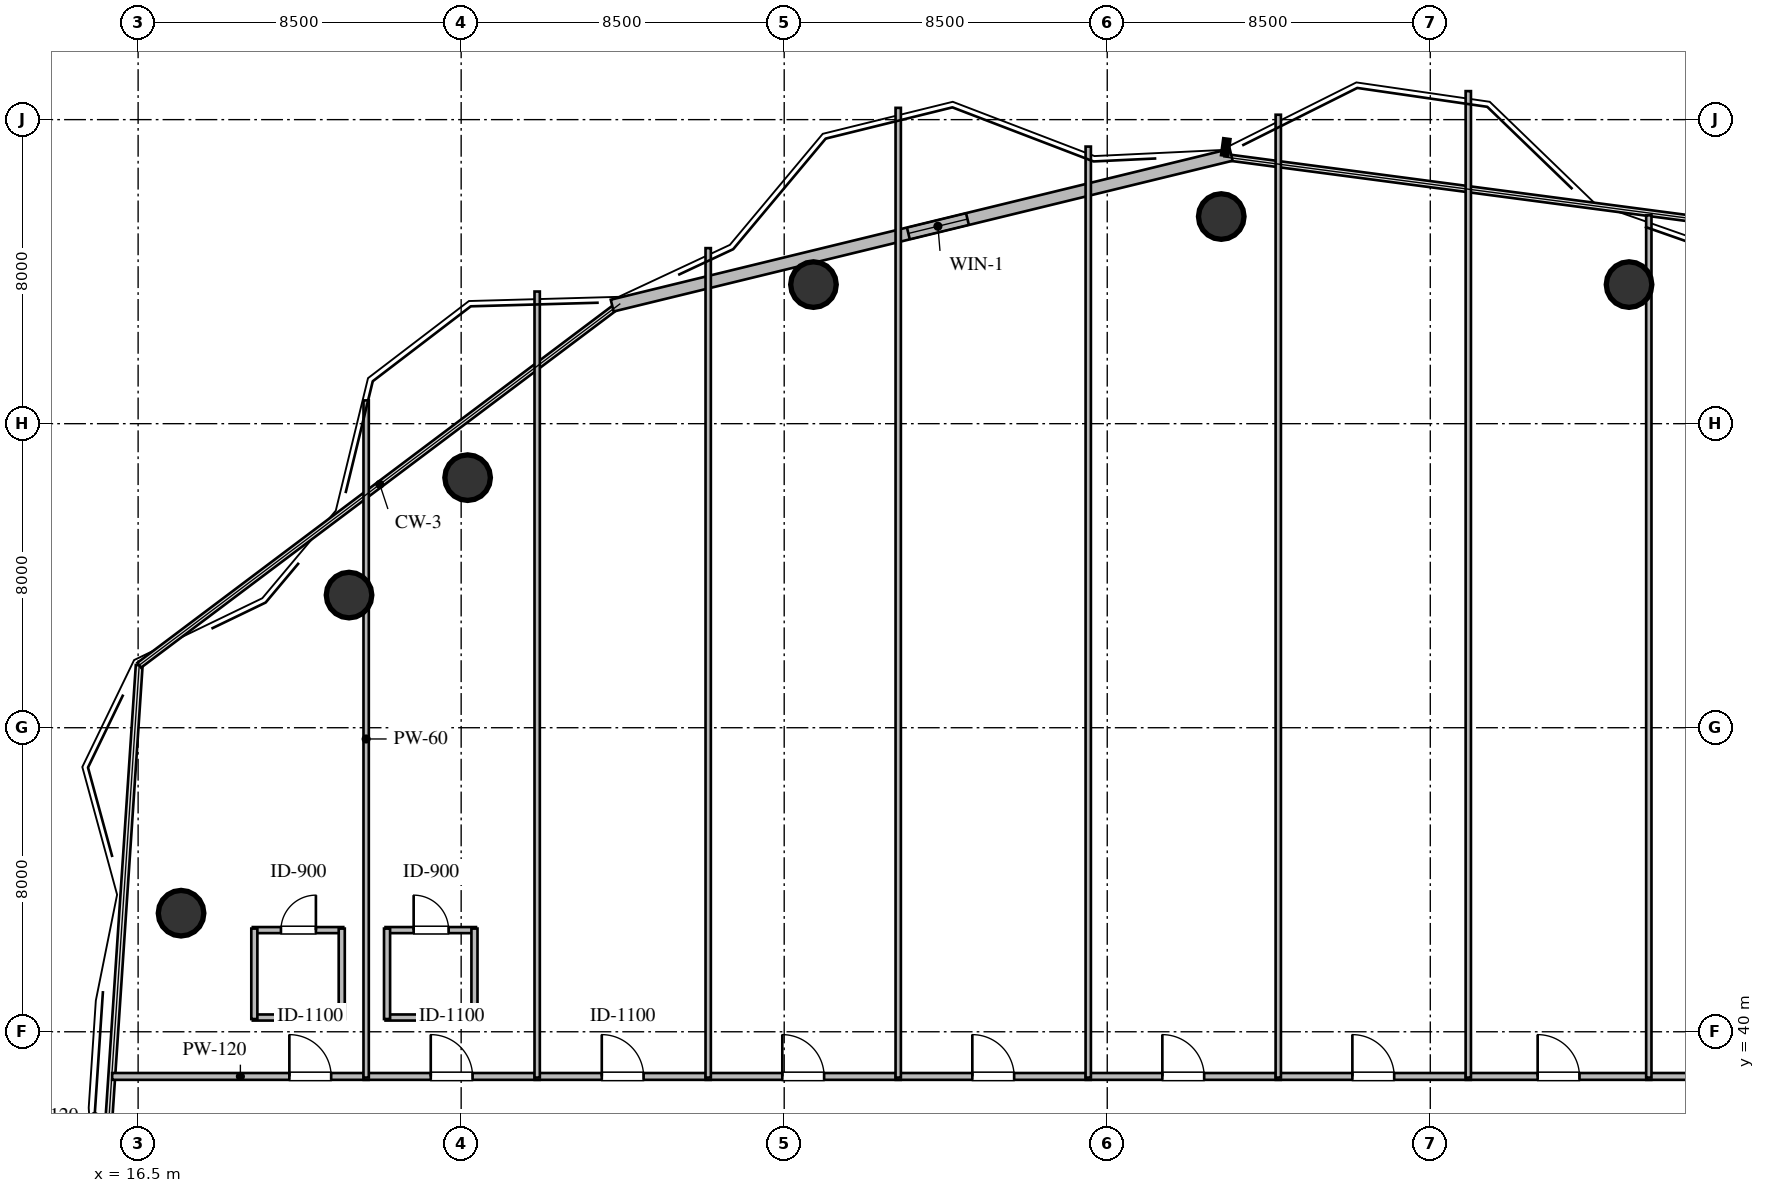
"""IFC4 building model, lengths in metres.
Left out: names, types, materials, properties, quantities, classifications, styles, units other than length and angle.
Written with IfcOpenShell. Run it as: python <this file> out.ifc"""

import sys

from ifc_helpers import new_model, si_unit, direction, frame, frame_2d, origin, origin_2d, place, context, subcontext, project, spatial, rectangle, circle, extrude, element, fill, save


model = new_model("IFC4")
c1 = context("Model", 3, precision=1e-05, world=origin(), true_north=direction((0.0, 1.0)))
c2 = subcontext(c1, "Body", "Model", "MODEL_VIEW")
j1 = project(units=[si_unit("LENGTHUNIT", "METRE"), si_unit("PLANEANGLEUNIT", "RADIAN")], contexts=[c1])
p1 = place(None, origin())
s1 = spatial("IfcSite", under=j1, at=p1, CompositionType="ELEMENT")
p2 = place(p1, origin())
s2 = spatial("IfcBuilding", under=s1, at=p2, CompositionType="ELEMENT")
p3 = place(p2, frame((0.0, 0.0, 127.8)))
s3 = spatial("IfcBuildingStorey", under=s2, at=p3, CompositionType="ELEMENT", Elevation=127.8)
for number, where, z_axis, x_axis in (
    (1, (55.73, 59.66, 0.0), (0.0, 0.0, 1.0), (1.0, 0.0, 0.0)),
    (2, (45.0, 61.45, 0.0), (0.0, 0.0, 1.0), (1.0, 0.0, 0.0)),
    (3, (34.27, 59.66, 0.0), (0.0, 0.0, 1.0), (1.0, 0.0, 0.0)),
    (4, (25.17, 54.58, 0.0), (0.0, 0.0, 1.0), (1.0, 0.0, 0.0)),
    (5, (22.05, 51.49, 0.0), (0.0, 0.0, 1.0), (1.0, 0.0, 0.0)),
    (6, (17.63, 43.12, 0.0), (0.0, 0.0, 1.0), (1.0, 0.0, 0.0)),
):
    element("IfcColumn", number, at=place(p3, frame(where, z_axis=z_axis, x_axis=x_axis)), inside=s3, PredefinedType="COLUMN", context=c2, shape_type="SweptSolid", body=[
        extrude(circle(Radius=0.6, at=origin_2d()), origin(), (0.0, 0.0, 1.0), 3.6),
    ])
p4 = place(p3, frame((28.974, 59.107, 0.0), z_axis=(0.0, 0.0, 1.0), x_axis=(0.971593971582, 0.236654081699, 0.0)))
e7 = element("IfcWall", 7, at=p4, inside=s3, PredefinedType="STANDARD", context=c2, shape_type="SweptSolid", body=[
    extrude(rectangle(XDim=16.763, YDim=0.32, at=frame_2d((8.381, 0.0))), origin(), (0.0, 0.0, 1.0), 3.36),
])
p5 = place(p4, frame((8.021, 0.0, 1.05)))
e8 = element("IfcOpeningElement", 8, at=p5, cuts=e7, PredefinedType="OPENING", context=c2, shape_type="SweptSolid", body=[
    extrude(rectangle(XDim=1.6, YDim=1.5, at=frame_2d((0.8, 0.75))), frame((0.0, 0.17, 0.0), z_axis=(0.0, -1.0, 0.0), x_axis=(1.0, 0.0, 0.0)), (0.0, 0.0, 1.0), 0.34),
])
p6 = place(p3, frame((19.518, 40.375, 0.0), z_axis=(0.0, 0.0, 1.0), x_axis=(1.0, 0.0, 0.0)))
e9 = element("IfcWall", 9, at=p6, inside=s3, PredefinedType="PLUMBINGWALL", context=c2, shape_type="SweptSolid", body=[
    extrude(rectangle(XDim=2.38, YDim=0.16, at=frame_2d((1.19, 0.0))), origin(), (0.0, 0.0, 1.0), 3.36),
])
p7 = place(p3, frame((19.518, 42.675, 0.0), z_axis=(0.0, 0.0, 1.0), x_axis=(1.0, 0.0, 0.0)))
e10 = element("IfcWall", 10, at=p7, inside=s3, PredefinedType="PLUMBINGWALL", context=c2, shape_type="SweptSolid", body=[
    extrude(rectangle(XDim=2.38, YDim=0.16, at=frame_2d((1.19, 0.0))), origin(), (0.0, 0.0, 1.0), 3.36),
])
p8 = place(p7, frame((0.74, 0.0, 0.0)))
e11 = element("IfcOpeningElement", 11, at=p8, cuts=e10, PredefinedType="OPENING", context=c2, shape_type="SweptSolid", body=[
    extrude(rectangle(XDim=0.92, YDim=2.1, at=frame_2d((0.46, 1.05))), frame((0.0, 0.09, 0.0), z_axis=(0.0, -1.0, 0.0), x_axis=(1.0, 0.0, 0.0)), (0.0, 0.0, 1.0), 0.18),
])
p9 = place(p3, frame((19.558, 40.335, 0.0), z_axis=(0.0, 0.0, 1.0), x_axis=(0.0, 1.0, 0.0)))
e12 = element("IfcWall", 12, at=p9, inside=s3, PredefinedType="PLUMBINGWALL", context=c2, shape_type="SweptSolid", body=[
    extrude(rectangle(XDim=2.38, YDim=0.16, at=frame_2d((1.19, 0.0))), origin(), (0.0, 0.0, 1.0), 3.36),
])
p10 = place(p3, frame((21.858, 40.335, 0.0), z_axis=(0.0, 0.0, 1.0), x_axis=(0.0, 1.0, 0.0)))
e13 = element("IfcWall", 13, at=p10, inside=s3, PredefinedType="PLUMBINGWALL", context=c2, shape_type="SweptSolid", body=[
    extrude(rectangle(XDim=2.38, YDim=0.16, at=frame_2d((1.19, 0.0))), origin(), (0.0, 0.0, 1.0), 2.89),
])
p11 = place(p3, frame((23.01, 40.375, 0.0), z_axis=(0.0, 0.0, 1.0), x_axis=(1.0, 0.0, 0.0)))
e14 = element("IfcWall", 14, at=p11, inside=s3, PredefinedType="PLUMBINGWALL", context=c2, shape_type="SweptSolid", body=[
    extrude(rectangle(XDim=2.38, YDim=0.16, at=frame_2d((1.19, 0.0))), origin(), (0.0, 0.0, 1.0), 3.36),
])
p12 = place(p3, frame((23.01, 42.675, 0.0), z_axis=(0.0, 0.0, 1.0), x_axis=(1.0, 0.0, 0.0)))
e15 = element("IfcWall", 15, at=p12, inside=s3, PredefinedType="PLUMBINGWALL", context=c2, shape_type="SweptSolid", body=[
    extrude(rectangle(XDim=2.38, YDim=0.16, at=frame_2d((1.19, 0.0))), origin(), (0.0, 0.0, 1.0), 3.36),
])
p13 = place(p12, frame((0.74, 0.0, 0.0)))
e16 = element("IfcOpeningElement", 16, at=p13, cuts=e15, PredefinedType="OPENING", context=c2, shape_type="SweptSolid", body=[
    extrude(rectangle(XDim=0.92, YDim=2.1, at=frame_2d((0.46, 1.05))), frame((0.0, 0.09, 0.0), z_axis=(0.0, -1.0, 0.0), x_axis=(1.0, 0.0, 0.0)), (0.0, 0.0, 1.0), 0.18),
])
p14 = place(p3, frame((23.05, 40.335, 0.0), z_axis=(0.0, 0.0, 1.0), x_axis=(0.0, 1.0, 0.0)))
e17 = element("IfcWall", 17, at=p14, inside=s3, PredefinedType="PLUMBINGWALL", context=c2, shape_type="SweptSolid", body=[
    extrude(rectangle(XDim=2.38, YDim=0.16, at=frame_2d((1.19, 0.0))), origin(), (0.0, 0.0, 1.0), 2.89),
])
p15 = place(p3, frame((25.35, 40.335, 0.0), z_axis=(0.0, 0.0, 1.0), x_axis=(0.0, 1.0, 0.0)))
e18 = element("IfcWall", 18, at=p15, inside=s3, PredefinedType="PLUMBINGWALL", context=c2, shape_type="SweptSolid", body=[
    extrude(rectangle(XDim=2.38, YDim=0.16, at=frame_2d((1.19, 0.0))), origin(), (0.0, 0.0, 1.0), 3.36),
])
p16 = place(p3, frame((15.817, 38.825, 0.0), z_axis=(0.0, 0.0, 1.0), x_axis=(1.0, 0.0, 0.0)))
e19 = element("IfcWall", 19, at=p16, inside=s3, PredefinedType="PARTITIONING", context=c2, shape_type="SweptSolid", body=[
    extrude(rectangle(XDim=6.748, YDim=0.18, at=frame_2d((3.374, 0.0))), origin(), (0.0, 0.0, 1.0), 3.36),
])
p17 = place(p16, frame((4.663, 0.0, 0.0)))
e20 = element("IfcOpeningElement", 20, at=p17, cuts=e19, PredefinedType="OPENING", context=c2, shape_type="SweptSolid", body=[
    extrude(rectangle(XDim=1.1, YDim=2.1, at=frame_2d((0.55, 1.05))), frame((0.0, 0.1, 0.0), z_axis=(0.0, -1.0, 0.0), x_axis=(1.0, 0.0, 0.0)), (0.0, 0.0, 1.0), 0.2),
])
p18 = place(p3, frame((22.435, 38.825, 0.0), z_axis=(0.0, 0.0, 1.0), x_axis=(1.0, 0.0, 0.0)))
e21 = element("IfcWall", 21, at=p18, inside=s3, PredefinedType="PARTITIONING", context=c2, shape_type="SweptSolid", body=[
    extrude(rectangle(XDim=4.63, YDim=0.18, at=frame_2d((2.315, 0.0))), origin(), (0.0, 0.0, 1.0), 3.36),
])
p19 = place(p18, frame((1.765, 0.0, 0.0)))
e22 = element("IfcOpeningElement", 22, at=p19, cuts=e21, PredefinedType="OPENING", context=c2, shape_type="SweptSolid", body=[
    extrude(rectangle(XDim=1.1, YDim=2.1, at=frame_2d((0.55, 1.05))), frame((0.0, 0.1, 0.0), z_axis=(0.0, -1.0, 0.0), x_axis=(1.0, 0.0, 0.0)), (0.0, 0.0, 1.0), 0.2),
])
p20 = place(p3, frame((26.935, 38.825, 0.0), z_axis=(0.0, 0.0, 1.0), x_axis=(1.0, 0.0, 0.0)))
e23 = element("IfcWall", 23, at=p20, inside=s3, PredefinedType="PARTITIONING", context=c2, shape_type="SweptSolid", body=[
    extrude(rectangle(XDim=4.63, YDim=0.18, at=frame_2d((2.315, 0.0))), origin(), (0.0, 0.0, 1.0), 3.36),
])
p21 = place(p20, frame((1.765, 0.0, 0.0)))
e24 = element("IfcOpeningElement", 24, at=p21, cuts=e23, PredefinedType="OPENING", context=c2, shape_type="SweptSolid", body=[
    extrude(rectangle(XDim=1.1, YDim=2.1, at=frame_2d((0.55, 1.05))), frame((0.0, 0.1, 0.0), z_axis=(0.0, -1.0, 0.0), x_axis=(1.0, 0.0, 0.0)), (0.0, 0.0, 1.0), 0.2),
])
p22 = place(p3, frame((31.435, 38.825, 0.0), z_axis=(0.0, 0.0, 1.0), x_axis=(1.0, 0.0, 0.0)))
e25 = element("IfcWall", 25, at=p22, inside=s3, PredefinedType="PARTITIONING", context=c2, shape_type="SweptSolid", body=[
    extrude(rectangle(XDim=5.13, YDim=0.18, at=frame_2d((2.565, 0.0))), origin(), (0.0, 0.0, 1.0), 3.36),
])
p23 = place(p22, frame((2.015, 0.0, 0.0)))
e26 = element("IfcOpeningElement", 26, at=p23, cuts=e25, PredefinedType="OPENING", context=c2, shape_type="SweptSolid", body=[
    extrude(rectangle(XDim=1.1, YDim=2.1, at=frame_2d((0.55, 1.05))), frame((0.0, 0.1, 0.0), z_axis=(0.0, -1.0, 0.0), x_axis=(1.0, 0.0, 0.0)), (0.0, 0.0, 1.0), 0.2),
])
p24 = place(p3, frame((36.435, 38.825, 0.0), z_axis=(0.0, 0.0, 1.0), x_axis=(1.0, 0.0, 0.0)))
e27 = element("IfcWall", 27, at=p24, inside=s3, PredefinedType="PARTITIONING", context=c2, shape_type="SweptSolid", body=[
    extrude(rectangle(XDim=5.13, YDim=0.18, at=frame_2d((2.565, 0.0))), origin(), (0.0, 0.0, 1.0), 3.36),
])
p25 = place(p24, frame((2.015, 0.0, 0.0)))
e28 = element("IfcOpeningElement", 28, at=p25, cuts=e27, PredefinedType="OPENING", context=c2, shape_type="SweptSolid", body=[
    extrude(rectangle(XDim=1.1, YDim=2.1, at=frame_2d((0.55, 1.05))), frame((0.0, 0.1, 0.0), z_axis=(0.0, -1.0, 0.0), x_axis=(1.0, 0.0, 0.0)), (0.0, 0.0, 1.0), 0.2),
])
p26 = place(p3, frame((41.435, 38.825, 0.0), z_axis=(0.0, 0.0, 1.0), x_axis=(1.0, 0.0, 0.0)))
e29 = element("IfcWall", 29, at=p26, inside=s3, PredefinedType="PARTITIONING", context=c2, shape_type="SweptSolid", body=[
    extrude(rectangle(XDim=5.13, YDim=0.18, at=frame_2d((2.565, 0.0))), origin(), (0.0, 0.0, 1.0), 3.36),
])
p27 = place(p26, frame((2.015, 0.0, 0.0)))
e30 = element("IfcOpeningElement", 30, at=p27, cuts=e29, PredefinedType="OPENING", context=c2, shape_type="SweptSolid", body=[
    extrude(rectangle(XDim=1.1, YDim=2.1, at=frame_2d((0.55, 1.05))), frame((0.0, 0.1, 0.0), z_axis=(0.0, -1.0, 0.0), x_axis=(1.0, 0.0, 0.0)), (0.0, 0.0, 1.0), 0.2),
])
p28 = place(p3, frame((46.435, 38.825, 0.0), z_axis=(0.0, 0.0, 1.0), x_axis=(1.0, 0.0, 0.0)))
e31 = element("IfcWall", 31, at=p28, inside=s3, PredefinedType="PARTITIONING", context=c2, shape_type="SweptSolid", body=[
    extrude(rectangle(XDim=5.13, YDim=0.18, at=frame_2d((2.565, 0.0))), origin(), (0.0, 0.0, 1.0), 3.36),
])
p29 = place(p28, frame((2.015, 0.0, 0.0)))
e32 = element("IfcOpeningElement", 32, at=p29, cuts=e31, PredefinedType="OPENING", context=c2, shape_type="SweptSolid", body=[
    extrude(rectangle(XDim=1.1, YDim=2.1, at=frame_2d((0.55, 1.05))), frame((0.0, 0.1, 0.0), z_axis=(0.0, -1.0, 0.0), x_axis=(1.0, 0.0, 0.0)), (0.0, 0.0, 1.0), 0.2),
])
p30 = place(p3, frame((51.435, 38.825, 0.0), z_axis=(0.0, 0.0, 1.0), x_axis=(1.0, 0.0, 0.0)))
e33 = element("IfcWall", 33, at=p30, inside=s3, PredefinedType="PARTITIONING", context=c2, shape_type="SweptSolid", body=[
    extrude(rectangle(XDim=4.88, YDim=0.18, at=frame_2d((2.44, 0.0))), origin(), (0.0, 0.0, 1.0), 3.36),
])
p31 = place(p30, frame((1.89, 0.0, 0.0)))
e34 = element("IfcOpeningElement", 34, at=p31, cuts=e33, PredefinedType="OPENING", context=c2, shape_type="SweptSolid", body=[
    extrude(rectangle(XDim=1.1, YDim=2.1, at=frame_2d((0.55, 1.05))), frame((0.0, 0.1, 0.0), z_axis=(0.0, -1.0, 0.0), x_axis=(1.0, 0.0, 0.0)), (0.0, 0.0, 1.0), 0.2),
])
p32 = place(p3, frame((56.185, 38.825, 0.0), z_axis=(0.0, 0.0, 1.0), x_axis=(1.0, 0.0, 0.0)))
e35 = element("IfcWall", 35, at=p32, inside=s3, PredefinedType="PARTITIONING", context=c2, shape_type="SweptSolid", body=[
    extrude(rectangle(XDim=4.88, YDim=0.18, at=frame_2d((2.44, 0.0))), origin(), (0.0, 0.0, 1.0), 3.36),
])
p33 = place(p32, frame((1.89, 0.0, 0.0)))
e36 = element("IfcOpeningElement", 36, at=p33, cuts=e35, PredefinedType="OPENING", context=c2, shape_type="SweptSolid", body=[
    extrude(rectangle(XDim=1.1, YDim=2.1, at=frame_2d((0.55, 1.05))), frame((0.0, 0.1, 0.0), z_axis=(0.0, -1.0, 0.0), x_axis=(1.0, 0.0, 0.0)), (0.0, 0.0, 1.0), 0.2),
])
p34 = place(p3, frame((22.5, 56.613, 0.0), z_axis=(0.0, 0.0, 1.0), x_axis=(0.0, -1.0, 0.0)))
e37 = element("IfcWall", 37, at=p34, inside=s3, PredefinedType="PARTITIONING", context=c2, shape_type="SweptSolid", body=[
    extrude(rectangle(XDim=17.818, YDim=0.14, at=frame_2d((8.909, 0.0))), origin(), (0.0, 0.0, 1.0), 2.89),
])
p35 = place(p3, frame((27.0, 59.477, 0.0), z_axis=(0.0, 0.0, 1.0), x_axis=(0.0, -1.0, 0.0)))
e38 = element("IfcWall", 38, at=p35, inside=s3, PredefinedType="PARTITIONING", context=c2, shape_type="SweptSolid", body=[
    extrude(rectangle(XDim=20.682, YDim=0.14, at=frame_2d((10.341, 0.0))), origin(), (0.0, 0.0, 1.0), 3.36),
])
p36 = place(p3, frame((31.5, 60.619, 0.0), z_axis=(0.0, 0.0, 1.0), x_axis=(0.0, -1.0, 0.0)))
e39 = element("IfcWall", 39, at=p36, inside=s3, PredefinedType="PARTITIONING", context=c2, shape_type="SweptSolid", body=[
    extrude(rectangle(XDim=21.824, YDim=0.14, at=frame_2d((10.912, 0.0))), origin(), (0.0, 0.0, 1.0), 3.36),
])
p37 = place(p3, frame((36.5, 64.31, 0.0), z_axis=(0.0, 0.0, 1.0), x_axis=(0.0, -1.0, 0.0)))
e40 = element("IfcWall", 40, at=p37, inside=s3, PredefinedType="PARTITIONING", context=c2, shape_type="SweptSolid", body=[
    extrude(rectangle(XDim=25.515, YDim=0.14, at=frame_2d((12.758, 0.0))), origin(), (0.0, 0.0, 1.0), 3.36),
])
p38 = place(p3, frame((41.5, 63.291, 0.0), z_axis=(0.0, 0.0, 1.0), x_axis=(0.0, -1.0, 0.0)))
e41 = element("IfcWall", 41, at=p38, inside=s3, PredefinedType="PARTITIONING", context=c2, shape_type="SweptSolid", body=[
    extrude(rectangle(XDim=24.496, YDim=0.14, at=frame_2d((12.248, 0.0))), origin(), (0.0, 0.0, 1.0), 3.36),
])
p39 = place(p3, frame((46.5, 64.129, 0.0), z_axis=(0.0, 0.0, 1.0), x_axis=(0.0, -1.0, 0.0)))
e42 = element("IfcWall", 42, at=p39, inside=s3, PredefinedType="PARTITIONING", context=c2, shape_type="SweptSolid", body=[
    extrude(rectangle(XDim=25.334, YDim=0.14, at=frame_2d((12.667, 0.0))), origin(), (0.0, 0.0, 1.0), 3.36),
])
p40 = place(p3, frame((51.5, 64.75, 0.0), z_axis=(0.0, 0.0, 1.0), x_axis=(0.0, -1.0, 0.0)))
e43 = element("IfcWall", 43, at=p40, inside=s3, PredefinedType="PARTITIONING", context=c2, shape_type="SweptSolid", body=[
    extrude(rectangle(XDim=25.955, YDim=0.14, at=frame_2d((12.978, 0.0))), origin(), (0.0, 0.0, 1.0), 3.36),
])
p41 = place(p3, frame((56.25, 61.482, 0.0), z_axis=(0.0, 0.0, 1.0), x_axis=(0.0, -1.0, 0.0)))
e44 = element("IfcWall", 44, at=p41, inside=s3, PredefinedType="PARTITIONING", context=c2, shape_type="SweptSolid", body=[
    extrude(rectangle(XDim=22.687, YDim=0.14, at=frame_2d((11.344, 0.0))), origin(), (0.0, 0.0, 1.0), 3.36),
])
p42 = place(p5, origin())
e45 = element("IfcWindow", 45, at=p42, inside=s3, PartitioningType="SINGLE_PANEL", PredefinedType="WINDOW", context=c2, shape_type="SweptSolid", body=[
    extrude(rectangle(XDim=1.6, YDim=1.5, at=frame_2d((0.8, 0.75))), frame((0.0, 0.03, 0.0), z_axis=(0.0, -1.0, 0.0), x_axis=(1.0, 0.0, 0.0)), (0.0, 0.0, 1.0), 0.06),
])
fill(e8, e45)
p43 = place(p8, origin())
e46 = element("IfcDoor", 46, at=p43, inside=s3, OperationType="SINGLE_SWING_RIGHT", PredefinedType="DOOR", context=c2, shape_type="SweptSolid", body=[
    extrude(rectangle(XDim=0.92, YDim=2.1, at=frame_2d((0.46, 1.05))), frame((0.0, 0.025, 0.0), z_axis=(0.0, -1.0, 0.0), x_axis=(1.0, 0.0, 0.0)), (0.0, 0.0, 1.0), 0.05),
])
fill(e11, e46)
p44 = place(p13, origin())
e47 = element("IfcDoor", 47, at=p44, inside=s3, OperationType="SINGLE_SWING_LEFT", PredefinedType="DOOR", context=c2, shape_type="SweptSolid", body=[
    extrude(rectangle(XDim=0.92, YDim=2.1, at=frame_2d((0.46, 1.05))), frame((0.0, 0.025, 0.0), z_axis=(0.0, -1.0, 0.0), x_axis=(1.0, 0.0, 0.0)), (0.0, 0.0, 1.0), 0.05),
])
fill(e16, e47)
p45 = place(p17, origin())
e48 = element("IfcDoor", 48, at=p45, inside=s3, OperationType="SINGLE_SWING_LEFT", PredefinedType="DOOR", context=c2, shape_type="SweptSolid", body=[
    extrude(rectangle(XDim=1.1, YDim=2.1, at=frame_2d((0.55, 1.05))), frame((0.0, 0.025, 0.0), z_axis=(0.0, -1.0, 0.0), x_axis=(1.0, 0.0, 0.0)), (0.0, 0.0, 1.0), 0.05),
])
fill(e20, e48)
p46 = place(p19, origin())
e49 = element("IfcDoor", 49, at=p46, inside=s3, OperationType="SINGLE_SWING_LEFT", PredefinedType="DOOR", context=c2, shape_type="SweptSolid", body=[
    extrude(rectangle(XDim=1.1, YDim=2.1, at=frame_2d((0.55, 1.05))), frame((0.0, 0.025, 0.0), z_axis=(0.0, -1.0, 0.0), x_axis=(1.0, 0.0, 0.0)), (0.0, 0.0, 1.0), 0.05),
])
fill(e22, e49)
p47 = place(p21, origin())
e50 = element("IfcDoor", 50, at=p47, inside=s3, OperationType="SINGLE_SWING_LEFT", PredefinedType="DOOR", context=c2, shape_type="SweptSolid", body=[
    extrude(rectangle(XDim=1.1, YDim=2.1, at=frame_2d((0.55, 1.05))), frame((0.0, 0.025, 0.0), z_axis=(0.0, -1.0, 0.0), x_axis=(1.0, 0.0, 0.0)), (0.0, 0.0, 1.0), 0.05),
])
fill(e24, e50)
p48 = place(p23, origin())
e51 = element("IfcDoor", 51, at=p48, inside=s3, OperationType="SINGLE_SWING_LEFT", PredefinedType="DOOR", context=c2, shape_type="SweptSolid", body=[
    extrude(rectangle(XDim=1.1, YDim=2.1, at=frame_2d((0.55, 1.05))), frame((0.0, 0.025, 0.0), z_axis=(0.0, -1.0, 0.0), x_axis=(1.0, 0.0, 0.0)), (0.0, 0.0, 1.0), 0.05),
])
fill(e26, e51)
p49 = place(p25, origin())
e52 = element("IfcDoor", 52, at=p49, inside=s3, OperationType="SINGLE_SWING_LEFT", PredefinedType="DOOR", context=c2, shape_type="SweptSolid", body=[
    extrude(rectangle(XDim=1.1, YDim=2.1, at=frame_2d((0.55, 1.05))), frame((0.0, 0.025, 0.0), z_axis=(0.0, -1.0, 0.0), x_axis=(1.0, 0.0, 0.0)), (0.0, 0.0, 1.0), 0.05),
])
fill(e28, e52)
p50 = place(p27, origin())
e53 = element("IfcDoor", 53, at=p50, inside=s3, OperationType="SINGLE_SWING_LEFT", PredefinedType="DOOR", context=c2, shape_type="SweptSolid", body=[
    extrude(rectangle(XDim=1.1, YDim=2.1, at=frame_2d((0.55, 1.05))), frame((0.0, 0.025, 0.0), z_axis=(0.0, -1.0, 0.0), x_axis=(1.0, 0.0, 0.0)), (0.0, 0.0, 1.0), 0.05),
])
fill(e30, e53)
p51 = place(p29, origin())
e54 = element("IfcDoor", 54, at=p51, inside=s3, OperationType="SINGLE_SWING_LEFT", PredefinedType="DOOR", context=c2, shape_type="SweptSolid", body=[
    extrude(rectangle(XDim=1.1, YDim=2.1, at=frame_2d((0.55, 1.05))), frame((0.0, 0.025, 0.0), z_axis=(0.0, -1.0, 0.0), x_axis=(1.0, 0.0, 0.0)), (0.0, 0.0, 1.0), 0.05),
])
fill(e32, e54)
p52 = place(p31, origin())
e55 = element("IfcDoor", 55, at=p52, inside=s3, OperationType="SINGLE_SWING_LEFT", PredefinedType="DOOR", context=c2, shape_type="SweptSolid", body=[
    extrude(rectangle(XDim=1.1, YDim=2.1, at=frame_2d((0.55, 1.05))), frame((0.0, 0.025, 0.0), z_axis=(0.0, -1.0, 0.0), x_axis=(1.0, 0.0, 0.0)), (0.0, 0.0, 1.0), 0.05),
])
fill(e34, e55)
save(model, sys.argv[1])
